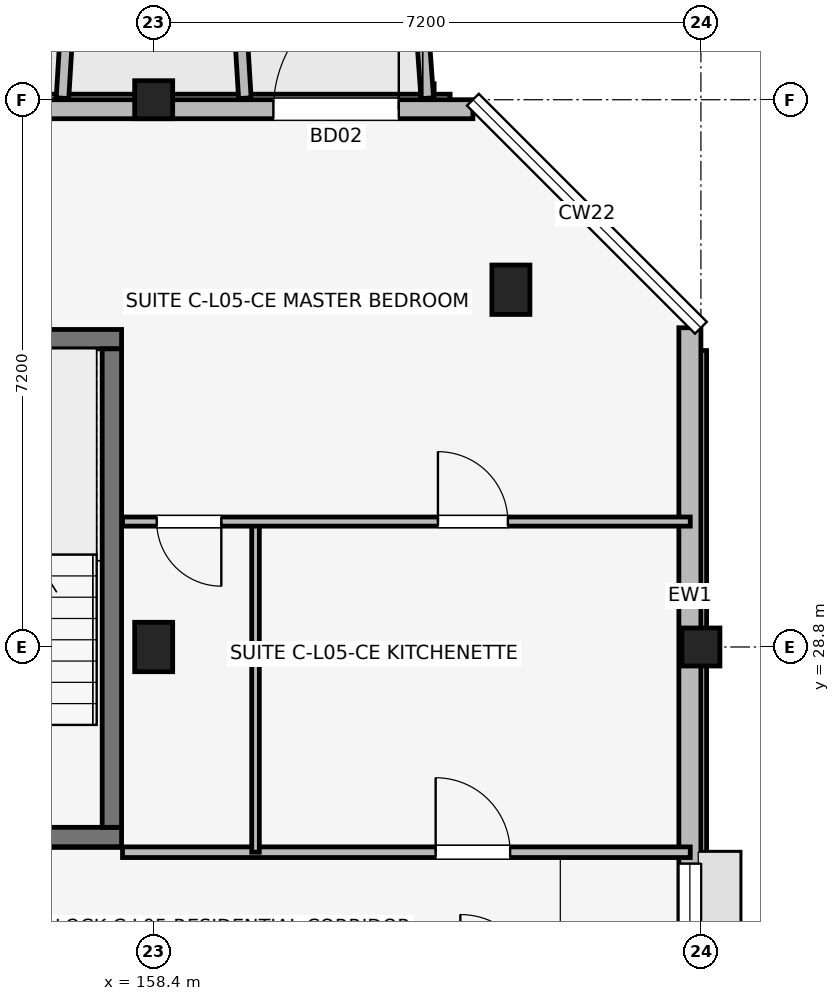
"""IFC4 building model, lengths in metres.
Left out: names, types, materials, properties, quantities, classifications, styles, units other than length and angle.
Written with IfcOpenShell. Run it as: python <this file> out.ifc"""

import sys

from ifc_helpers import new_model, si_unit, direction, frame, frame_2d, origin, origin_2d, place, context, subcontext, project, spatial, rectangle, extrude, element, fill, save


model = new_model("IFC4")
c1 = context("Model", 3, precision=1e-05, world=origin(), true_north=direction((0.0, 1.0)))
c2 = subcontext(c1, "Body", "Model", "MODEL_VIEW")
j1 = project(units=[si_unit("LENGTHUNIT", "METRE"), si_unit("PLANEANGLEUNIT", "RADIAN")], contexts=[c1])
p1 = place(None, origin())
s1 = spatial("IfcSite", under=j1, at=p1, CompositionType="ELEMENT")
p2 = place(p1, origin())
s2 = spatial("IfcBuilding", under=s1, at=p2, CompositionType="ELEMENT")
p3 = place(p2, frame((0.0, 0.0, 18.15)))
s3 = spatial("IfcBuildingStorey", under=s2, at=p3, CompositionType="ELEMENT", Elevation=18.15)
p4 = place(p3, frame((158.4, 28.8, 0.0), z_axis=(0.0, 0.0, 1.0), x_axis=(1.0, 0.0, 0.0)))
e1 = element("IfcColumn", 1, at=p4, inside=s3, PredefinedType="COLUMN", context=c2, shape_type="SweptSolid", body=[
    extrude(rectangle(XDim=0.5, YDim=0.65, at=origin_2d()), origin(), (0.0, 0.0, 1.0), 3.15),
])
for number, where, z_axis, x_axis in (
    (2, (158.4, 36.0, 0.0), (0.0, 0.0, 1.0), (1.0, 0.0, 0.0)),
    (3, (165.6, 28.8, 0.0), (0.0, 0.0, 1.0), (1.0, 0.0, 0.0)),
):
    element("IfcColumn", number, at=place(p3, frame(where, z_axis=z_axis, x_axis=x_axis)), inside=s3, PredefinedType="COLUMN", context=c2, shape_type="SweptSolid", body=[
        extrude(rectangle(XDim=0.5, YDim=0.5, at=origin_2d()), origin(), (0.0, 0.0, 1.0), 3.15),
    ])
p5 = place(p3, frame((163.1, 33.5, 0.0), z_axis=(0.0, 0.0, 1.0), x_axis=(1.0, 0.0, 0.0)))
e4 = element("IfcColumn", 4, at=p5, inside=s3, PredefinedType="COLUMN", context=c2, shape_type="SweptSolid", body=[
    extrude(rectangle(XDim=0.5, YDim=0.65, at=origin_2d()), origin(), (0.0, 0.0, 1.0), 3.15),
])
p6 = place(p3, frame((154.673, 26.3, 0.0), z_axis=(0.0, 0.0, 1.0), x_axis=(1.0, 0.0, 0.0)))
e5 = element("IfcWall", 5, at=p6, inside=s3, PredefinedType="SHEAR", context=c2, shape_type="SweptSolid", body=[
    extrude(rectangle(XDim=3.305, YDim=0.255, at=frame_2d((1.652, 0.0))), origin(), (0.0, 0.0, 1.0), 3.15),
])
p7 = place(p6, frame((1.127, 0.0, 0.0)))
e6 = element("IfcOpeningElement", 6, at=p7, cuts=e5, PredefinedType="OPENING", context=c2, shape_type="SweptSolid", body=[
    extrude(rectangle(XDim=1.05, YDim=2.12, at=frame_2d((0.525, 1.06))), frame((0.0, 0.137, 0.0), z_axis=(0.0, -1.0, 0.0), x_axis=(1.0, 0.0, 0.0)), (0.0, 0.0, 1.0), 0.275),
])
p8 = place(p3, frame((154.673, 32.85, 0.0), z_axis=(0.0, 0.0, 1.0), x_axis=(1.0, 0.0, 0.0)))
e7 = element("IfcWall", 7, at=p8, inside=s3, PredefinedType="SHEAR", context=c2, shape_type="SweptSolid", body=[
    extrude(rectangle(XDim=3.305, YDim=0.255, at=frame_2d((1.652, 0.0))), origin(), (0.0, 0.0, 1.0), 3.15),
])
p9 = place(p3, frame((157.85, 26.427, 0.0), z_axis=(0.0, 0.0, 1.0), x_axis=(0.0, 1.0, 0.0)))
e8 = element("IfcWall", 8, at=p9, inside=s3, PredefinedType="SHEAR", context=c2, shape_type="SweptSolid", body=[
    extrude(rectangle(XDim=6.295, YDim=0.255, at=frame_2d((3.147, 0.0))), origin(), (0.0, 0.0, 1.0), 3.15),
])
p10 = place(p3, frame((165.455, 17.4, 0.0), z_axis=(0.0, 0.0, 1.0), x_axis=(0.0, 1.0, 0.0)))
e9 = element("IfcWall", 9, at=p10, inside=s3, PredefinedType="SOLIDWALL", context=c2, shape_type="SweptSolid", body=[
    extrude(rectangle(XDim=15.6, YDim=0.29, at=frame_2d((7.8, 0.0))), origin(), (0.0, 0.0, 1.0), 2.38),
])
p11 = place(p10, frame((7.05, 0.0, 1.05)))
e10 = element("IfcOpeningElement", 10, at=p11, cuts=e9, PredefinedType="OPENING", context=c2, shape_type="SweptSolid", body=[
    extrude(rectangle(XDim=1.5, YDim=1.15, at=frame_2d((0.75, 0.575))), frame((0.0, 0.155, 0.0), z_axis=(0.0, -1.0, 0.0), x_axis=(1.0, 0.0, 0.0)), (0.0, 0.0, 1.0), 0.31),
])
p12 = place(p10, frame((0.98, 0.0, 0.67)))
e11 = element("IfcOpeningElement", 11, at=p12, cuts=e9, PredefinedType="OPENING", context=c2, shape_type="SweptSolid", body=[
    extrude(rectangle(XDim=1.42, YDim=1.6, at=frame_2d((0.71, 0.8))), frame((0.0, 0.155, 0.0), z_axis=(0.0, -1.0, 0.0), x_axis=(1.0, 0.0, 0.0)), (0.0, 0.0, 1.0), 0.31),
])
p13 = place(p3, frame((162.6, 35.875, 0.0), z_axis=(0.0, 0.0, 1.0), x_axis=(-1.0, 0.0, 0.0)))
e12 = element("IfcWall", 12, at=p13, inside=s3, PredefinedType="SOLIDWALL", context=c2, shape_type="SweptSolid", body=[
    extrude(rectangle(XDim=30.0, YDim=0.25, at=frame_2d((15.0, 0.0))), origin(), (0.0, 0.0, 1.0), 2.43),
])
p14 = place(p13, frame((28.95, 0.0, 0.0), z_axis=(0.0, 0.0, 1.0), x_axis=(-1.0, 0.0, 0.0)))
e13 = element("IfcOpeningElement", 13, at=p14, cuts=e12, PredefinedType="OPENING", context=c2, shape_type="SweptSolid", body=[
    extrude(rectangle(XDim=1.5, YDim=2.15, at=frame_2d((0.75, 1.075))), frame((0.0, 0.135, 0.0), z_axis=(0.0, -1.0, 0.0), x_axis=(1.0, 0.0, 0.0)), (0.0, 0.0, 1.0), 0.27),
])
p15 = place(p13, frame((2.625, 0.0, 0.0), z_axis=(0.0, 0.0, 1.0), x_axis=(-1.0, 0.0, 0.0)))
e14 = element("IfcOpeningElement", 14, at=p15, cuts=e12, PredefinedType="OPENING", context=c2, shape_type="SweptSolid", body=[
    extrude(rectangle(XDim=1.65, YDim=2.15, at=frame_2d((0.825, 1.075))), frame((0.0, 0.135, 0.0), z_axis=(0.0, -1.0, 0.0), x_axis=(1.0, 0.0, 0.0)), (0.0, 0.0, 1.0), 0.27),
])
p16 = place(p13, frame((15.23, 0.0, 0.5)))
e15 = element("IfcOpeningElement", 15, at=p16, cuts=e12, PredefinedType="OPENING", context=c2, shape_type="SweptSolid", body=[
    extrude(rectangle(XDim=1.15, YDim=1.68, at=frame_2d((0.575, 0.84))), frame((0.0, 0.135, 0.0), z_axis=(0.0, -1.0, 0.0), x_axis=(1.0, 0.0, 0.0)), (0.0, 0.0, 1.0), 0.27),
])
p17 = place(p13, frame((8.285, 0.0, 0.7)))
e16 = element("IfcOpeningElement", 16, at=p17, cuts=e12, PredefinedType="OPENING", context=c2, shape_type="SweptSolid", body=[
    extrude(rectangle(XDim=1.58, YDim=1.6, at=frame_2d((0.79, 0.8))), frame((0.0, 0.135, 0.0), z_axis=(0.0, -1.0, 0.0), x_axis=(1.0, 0.0, 0.0)), (0.0, 0.0, 1.0), 0.27),
])
p18 = place(p13, frame((20.04, 0.0, 0.7)))
e17 = element("IfcOpeningElement", 17, at=p18, cuts=e12, PredefinedType="OPENING", context=c2, shape_type="SweptSolid", body=[
    extrude(rectangle(XDim=1.72, YDim=1.6, at=frame_2d((0.86, 0.8))), frame((0.0, 0.135, 0.0), z_axis=(0.0, -1.0, 0.0), x_axis=(1.0, 0.0, 0.0)), (0.0, 0.0, 1.0), 0.27),
])
p19 = place(p3, frame((157.2, 36.02, 0.0), z_axis=(0.0, 0.0, 1.0), x_axis=(0.061170732449, 0.998127317276, 0.0)))
e18 = element("IfcWall", 18, at=p19, inside=s3, PredefinedType="ELEMENTEDWALL", context=c2, shape_type="SweptSolid", body=[
    extrude(rectangle(XDim=1.964, YDim=0.165, at=frame_2d((0.982, 0.0))), origin(), (0.0, 0.0, 1.0), 2.53),
])
p20 = place(p3, frame((159.6, 36.02, 0.0), z_axis=(0.0, 0.0, 1.0), x_axis=(-0.061170732449, 0.998127317276, 0.0)))
e19 = element("IfcWall", 19, at=p20, inside=s3, PredefinedType="ELEMENTEDWALL", context=c2, shape_type="SweptSolid", body=[
    extrude(rectangle(XDim=1.964, YDim=0.165, at=frame_2d((0.982, 0.0))), origin(), (0.0, 0.0, 1.0), 2.95),
])
p21 = place(p3, frame((162.0, 36.02, 0.0), z_axis=(0.0, 0.0, 1.0), x_axis=(-0.071194071069, 0.997462482625, 0.0)))
e20 = element("IfcWall", 20, at=p21, inside=s3, PredefinedType="ELEMENTEDWALL", context=c2, shape_type="SweptSolid", body=[
    extrude(rectangle(XDim=1.965, YDim=0.165, at=frame_2d((0.982, 0.0))), origin(), (0.0, 0.0, 1.0), 2.95),
])
p22 = place(p3, frame((157.99, 26.1, 0.0), z_axis=(0.0, 0.0, 1.0), x_axis=(1.0, 0.0, 0.0)))
e21 = element("IfcWall", 21, at=p22, inside=s3, PredefinedType="PARTITIONING", context=c2, shape_type="SweptSolid", body=[
    extrude(rectangle(XDim=7.47, YDim=0.14, at=frame_2d((3.735, 0.0))), origin(), (0.0, 0.0, 1.0), 2.38),
])
p23 = place(p22, frame((4.12, 0.0, 0.0)))
e22 = element("IfcOpeningElement", 22, at=p23, cuts=e21, PredefinedType="OPENING", context=c2, shape_type="SweptSolid", body=[
    extrude(rectangle(XDim=0.98, YDim=2.1, at=frame_2d((0.49, 1.05))), frame((0.0, 0.08, 0.0), z_axis=(0.0, -1.0, 0.0), x_axis=(1.0, 0.0, 0.0)), (0.0, 0.0, 1.0), 0.16),
])
p24 = place(p3, frame((159.74, 26.1, 0.0), z_axis=(0.0, 0.0, 1.0), x_axis=(0.0, 1.0, 0.0)))
e23 = element("IfcWall", 23, at=p24, inside=s3, PredefinedType="PARTITIONING", context=c2, shape_type="SweptSolid", body=[
    extrude(rectangle(XDim=4.35, YDim=0.1, at=frame_2d((2.175, 0.0))), origin(), (0.0, 0.0, 1.0), 2.375),
])
p25 = place(p3, frame((157.99, 30.45, 0.0), z_axis=(0.0, 0.0, 1.0), x_axis=(1.0, 0.0, 0.0)))
e24 = element("IfcWall", 24, at=p25, inside=s3, PredefinedType="PARTITIONING", context=c2, shape_type="SweptSolid", body=[
    extrude(rectangle(XDim=7.47, YDim=0.12, at=frame_2d((3.735, 0.0))), origin(), (0.0, 0.0, 1.0), 2.38),
])
p26 = place(p25, frame((1.3, 0.0, 0.0), z_axis=(0.0, 0.0, 1.0), x_axis=(-1.0, 0.0, 0.0)))
e25 = element("IfcOpeningElement", 25, at=p26, cuts=e24, PredefinedType="OPENING", context=c2, shape_type="SweptSolid", body=[
    extrude(rectangle(XDim=0.85, YDim=2.08, at=frame_2d((0.425, 1.04))), frame((0.0, 0.07, 0.0), z_axis=(0.0, -1.0, 0.0), x_axis=(1.0, 0.0, 0.0)), (0.0, 0.0, 1.0), 0.14),
])
p27 = place(p25, frame((4.15, 0.0, 0.0)))
e26 = element("IfcOpeningElement", 26, at=p27, cuts=e24, PredefinedType="OPENING", context=c2, shape_type="SweptSolid", body=[
    extrude(rectangle(XDim=0.92, YDim=2.08, at=frame_2d((0.46, 1.04))), frame((0.0, 0.07, 0.0), z_axis=(0.0, -1.0, 0.0), x_axis=(1.0, 0.0, 0.0)), (0.0, 0.0, 1.0), 0.14),
])
p28 = place(p15, origin())
e27 = element("IfcDoor", 27, at=p28, inside=s3, OperationType="SINGLE_SWING_LEFT", PredefinedType="DOOR", context=c2, shape_type="SweptSolid", body=[
    extrude(rectangle(XDim=1.65, YDim=2.15, at=frame_2d((0.825, 1.075))), frame((0.0, 0.025, 0.0), z_axis=(0.0, -1.0, 0.0), x_axis=(1.0, 0.0, 0.0)), (0.0, 0.0, 1.0), 0.05),
])
fill(e14, e27)
p29 = place(p11, origin())
e28 = element("IfcWindow", 28, at=p29, inside=s3, PartitioningType="SINGLE_PANEL", PredefinedType="WINDOW", context=c2, shape_type="SweptSolid", body=[
    extrude(rectangle(XDim=1.5, YDim=1.15, at=frame_2d((0.75, 0.575))), frame((0.0, 0.03, 0.0), z_axis=(0.0, -1.0, 0.0), x_axis=(1.0, 0.0, 0.0)), (0.0, 0.0, 1.0), 0.06),
])
fill(e10, e28)
p30 = place(p23, origin())
e29 = element("IfcDoor", 29, at=p30, inside=s3, OperationType="SINGLE_SWING_LEFT", PredefinedType="DOOR", context=c2, shape_type="SweptSolid", body=[
    extrude(rectangle(XDim=0.98, YDim=2.1, at=frame_2d((0.49, 1.05))), frame((0.0, 0.025, 0.0), z_axis=(0.0, -1.0, 0.0), x_axis=(1.0, 0.0, 0.0)), (0.0, 0.0, 1.0), 0.05),
])
fill(e22, e29)
p31 = place(p26, origin())
e30 = element("IfcDoor", 30, at=p31, inside=s3, OperationType="SINGLE_SWING_RIGHT", PredefinedType="DOOR", context=c2, shape_type="SweptSolid", body=[
    extrude(rectangle(XDim=0.85, YDim=2.08, at=frame_2d((0.425, 1.04))), frame((0.0, 0.025, 0.0), z_axis=(0.0, -1.0, 0.0), x_axis=(1.0, 0.0, 0.0)), (0.0, 0.0, 1.0), 0.05),
])
fill(e25, e30)
p32 = place(p27, origin())
e31 = element("IfcDoor", 31, at=p32, inside=s3, OperationType="SINGLE_SWING_LEFT", PredefinedType="DOOR", context=c2, shape_type="SweptSolid", body=[
    extrude(rectangle(XDim=0.92, YDim=2.08, at=frame_2d((0.46, 1.04))), frame((0.0, 0.025, 0.0), z_axis=(0.0, -1.0, 0.0), x_axis=(1.0, 0.0, 0.0)), (0.0, 0.0, 1.0), 0.05),
])
fill(e26, e31)
save(model, sys.argv[1])
